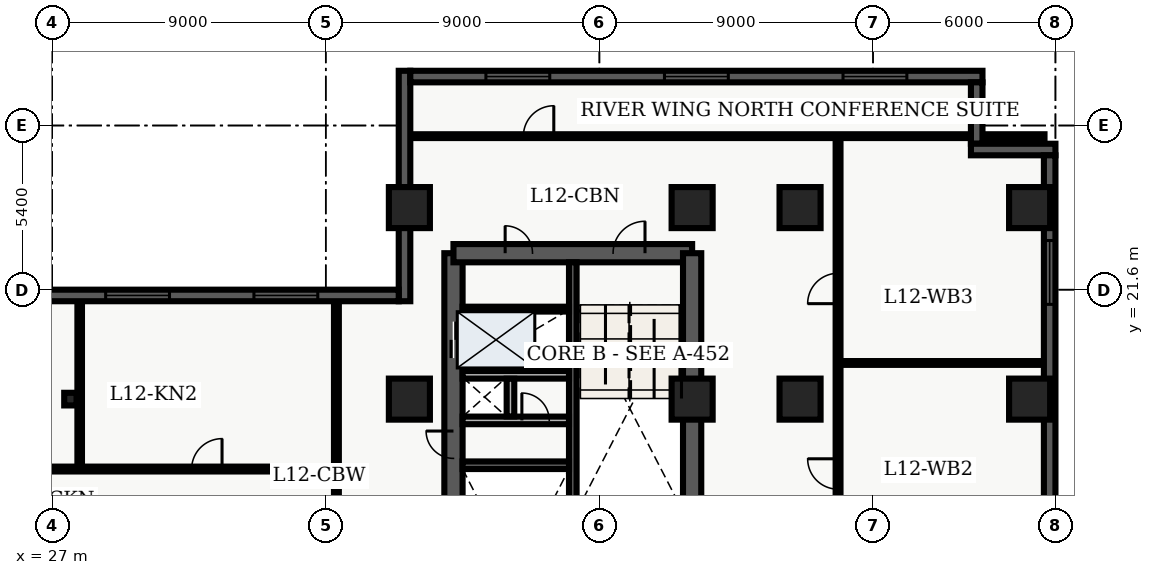
"""IFC4 building model, lengths in metres.
Left out: names, types, materials, properties, quantities, classifications, styles, units other than length and angle.
Written with IfcOpenShell. Run it as: python <this file> out.ifc"""

import sys

from ifc_helpers import new_model, entity, si_unit, converted_unit, direction, frame, origin_with_axes, origin_2d_with_axis, place, context, subcontext, project, spatial, polyline, rectangle, i_section, outline, extrude, element, fill, save


model = new_model("IFC4")
c1 = context("Model", 3, precision=1e-05, world=origin_with_axes(), true_north=direction((0.0, 1.0)))
c2 = subcontext(c1, "Body", "Model", "MODEL_VIEW")
j1 = project(units=[si_unit("LENGTHUNIT", "METRE"), converted_unit("PLANEANGLEUNIT", "DEGREE", entity("IfcPlaneAngleMeasure", 0.017), si_unit("PLANEANGLEUNIT", "RADIAN"), dimensions=[0, 0, 0, 0, 0, 0, 0])], contexts=[c1])
p1 = place(None, origin_with_axes())
s1 = spatial("IfcSite", under=j1, at=p1, CompositionType="ELEMENT")
p2 = place(p1, origin_with_axes())
s2 = spatial("IfcBuilding", under=s1, at=p2, CompositionType="ELEMENT")
p3 = place(p2, frame((0.0, 0.0, 52.2), z_axis=(0.0, 0.0, 1.0), x_axis=(1.0, 0.0, 0.0)))
s3 = spatial("IfcBuildingStorey", under=s2, at=p3, CompositionType="ELEMENT", Elevation=52.2)
p4 = place(p3, frame((40.2, 7.2, 0.0), z_axis=(0.0, 0.0, 1.0), x_axis=(0.0, 1.0, 0.0)))
e1 = element("IfcWall", 1, at=p4, inside=s3, PredefinedType="SHEAR", context=c2, shape_type="SweptSolid", body=[
    extrude(outline(polyline([(0.0, -0.3), (15.6, -0.3), (15.6, 0.3), (0.0, 0.3), (0.0, -0.3)])), origin_with_axes(), (0.0, 0.0, 1.0), 3.66),
])
p5 = place(p4, frame((12.75, 0.0, 0.0), z_axis=(0.0, 0.0, 1.0), x_axis=(1.0, 0.0, 0.0)))
e2 = element("IfcOpeningElement", 2, at=p5, cuts=e1, PredefinedType="OPENING", context=c2, shape_type="SweptSolid", body=[
    extrude(rectangle(XDim=1.2, YDim=0.62, at=origin_2d_with_axis()), origin_with_axes(), (0.0, 0.0, 1.0), 2.15),
])
p6 = place(p4, frame((9.3, 0.0, 0.0), z_axis=(0.0, 0.0, 1.0), x_axis=(1.0, 0.0, 0.0)))
e3 = element("IfcOpeningElement", 3, at=p6, cuts=e1, PredefinedType="OPENING", context=c2, shape_type="SweptSolid", body=[
    extrude(rectangle(XDim=0.9, YDim=0.62, at=origin_2d_with_axis()), origin_with_axes(), (0.0, 0.0, 1.0), 2.15),
])
p7 = place(p3, frame((40.2, 22.8, 0.0), z_axis=(0.0, 0.0, 1.0), x_axis=(1.0, 0.0, 0.0)))
e4 = element("IfcWall", 4, at=p7, inside=s3, PredefinedType="SHEAR", context=c2, shape_type="SweptSolid", body=[
    extrude(outline(polyline([(0.0, -0.3), (7.85, -0.3), (7.85, 0.3), (0.0, 0.3), (0.0, -0.3)])), origin_with_axes(), (0.0, 0.0, 1.0), 3.66),
])
p8 = place(p7, frame((5.775, 0.0, 0.0), z_axis=(0.0, 0.0, 1.0), x_axis=(1.0, 0.0, 0.0)))
e5 = element("IfcOpeningElement", 5, at=p8, cuts=e4, PredefinedType="OPENING", context=c2, shape_type="SweptSolid", body=[
    extrude(rectangle(XDim=1.05, YDim=0.62, at=origin_2d_with_axis()), origin_with_axes(), (0.0, 0.0, 1.0), 2.15),
])
p9 = place(p7, frame((2.15, 0.0, 0.0), z_axis=(0.0, 0.0, 1.0), x_axis=(1.0, 0.0, 0.0)))
e6 = element("IfcOpeningElement", 6, at=p9, cuts=e4, PredefinedType="OPENING", context=c2, shape_type="SweptSolid", body=[
    extrude(rectangle(XDim=0.9, YDim=0.62, at=origin_2d_with_axis()), origin_with_axes(), (0.0, 0.0, 1.0), 2.15),
])
p10 = place(p3, frame((48.05, 7.2, 0.0), z_axis=(0.0, 0.0, 1.0), x_axis=(0.0, 1.0, 0.0)))
e7 = element("IfcWall", 7, at=p10, inside=s3, PredefinedType="SHEAR", context=c2, shape_type="SweptSolid", body=[
    extrude(outline(polyline([(0.0, -0.3), (15.6, -0.3), (15.6, 0.3), (0.0, 0.3), (0.0, -0.3)])), origin_with_axes(), (0.0, 0.0, 1.0), 3.66),
])
p11 = place(p10, frame((1.425, 0.0, 0.0), z_axis=(0.0, 0.0, 1.0), x_axis=(1.0, 0.0, 0.0)))
e8 = element("IfcOpeningElement", 8, at=p11, cuts=e7, PredefinedType="OPENING", context=c2, shape_type="SweptSolid", body=[
    extrude(rectangle(XDim=1.05, YDim=0.62, at=origin_2d_with_axis()), origin_with_axes(), (0.0, 0.0, 1.0), 2.15),
])
p12 = place(p10, frame((3.475, 0.0, 0.0), z_axis=(0.0, 0.0, 1.0), x_axis=(1.0, 0.0, 0.0)))
e9 = element("IfcOpeningElement", 9, at=p12, cuts=e7, PredefinedType="OPENING", context=c2, shape_type="SweptSolid", body=[
    extrude(rectangle(XDim=1.05, YDim=0.62, at=origin_2d_with_axis()), origin_with_axes(), (0.0, 0.0, 1.0), 2.15),
])
p13 = place(p10, frame((5.625, 0.0, 0.0), z_axis=(0.0, 0.0, 1.0), x_axis=(1.0, 0.0, 0.0)))
e10 = element("IfcOpeningElement", 10, at=p13, cuts=e7, PredefinedType="OPENING", context=c2, shape_type="SweptSolid", body=[
    extrude(rectangle(XDim=0.95, YDim=0.62, at=origin_2d_with_axis()), origin_with_axes(), (0.0, 0.0, 1.0), 2.15),
])
p14 = place(p3, frame((44.125, 7.5, 0.0), z_axis=(0.0, 0.0, 1.0), x_axis=(0.0, 1.0, 0.0)))
e11 = element("IfcWall", 11, at=p14, inside=s3, PredefinedType="SHEAR", context=c2, shape_type="SweptSolid", body=[
    extrude(outline(polyline([(0.0, -0.125), (15.0, -0.125), (15.0, 0.125), (0.0, 0.125), (0.0, -0.125)])), origin_with_axes(), (0.0, 0.0, 1.0), 3.66),
])
p15 = place(p3, frame((40.5, 15.825, 0.0), z_axis=(0.0, 0.0, 1.0), x_axis=(1.0, 0.0, 0.0)))
e12 = element("IfcWall", 12, at=p15, inside=s3, PredefinedType="SHEAR", context=c2, shape_type="SweptSolid", body=[
    extrude(outline(polyline([(0.0, -0.125), (3.5, -0.125), (3.5, 0.125), (0.0, 0.125), (0.0, -0.125)])), origin_with_axes(), (0.0, 0.0, 1.0), 3.66),
])
p16 = place(p3, frame((40.5, 17.3, 0.0), z_axis=(0.0, 0.0, 1.0), x_axis=(1.0, 0.0, 0.0)))
e13 = element("IfcWall", 13, at=p16, inside=s3, PredefinedType="SOLIDWALL", context=c2, shape_type="SweptSolid", body=[
    extrude(outline(polyline([(0.0, -0.125), (3.5, -0.125), (3.5, 0.125), (0.0, 0.125), (0.0, -0.125)])), origin_with_axes(), (0.0, 0.0, 1.0), 2.7),
])
p17 = place(p16, frame((2.4, 0.0, 0.0), z_axis=(0.0, 0.0, 1.0), x_axis=(1.0, 0.0, 0.0)))
e14 = element("IfcOpeningElement", 14, at=p17, cuts=e13, PredefinedType="OPENING", context=c2, shape_type="SweptSolid", body=[
    extrude(rectangle(XDim=0.9, YDim=0.27, at=origin_2d_with_axis()), origin_with_axes(), (0.0, 0.0, 1.0), 2.15),
])
p18 = place(p3, frame((40.5, 18.8, 0.0), z_axis=(0.0, 0.0, 1.0), x_axis=(1.0, 0.0, 0.0)))
e15 = element("IfcWall", 15, at=p18, inside=s3, PredefinedType="SOLIDWALL", context=c2, shape_type="SweptSolid", body=[
    extrude(outline(polyline([(0.0, -0.125), (3.5, -0.125), (3.5, 0.125), (0.0, 0.125), (0.0, -0.125)])), origin_with_axes(), (0.0, 0.0, 1.0), 2.7),
])
p19 = place(p3, frame((42.075, 17.43, 0.0), z_axis=(0.0, 0.0, 1.0), x_axis=(0.0, 1.0, 0.0)))
e16 = element("IfcWall", 16, at=p19, inside=s3, PredefinedType="SOLIDWALL", context=c2, shape_type="SweptSolid", body=[
    extrude(outline(polyline([(0.0, -0.125), (1.24, -0.125), (1.24, 0.125), (0.0, 0.125), (0.0, -0.125)])), origin_with_axes(), (0.0, 0.0, 1.0), 2.7),
])
p20 = place(p3, frame((27.6, 18.0, 0.0), z_axis=(0.0, 0.0, 1.0), x_axis=(1.0, 0.0, 0.0)))
e17 = element("IfcColumn", 17, at=p20, inside=s3, PredefinedType="COLUMN", context=c2, shape_type="SweptSolid", body=[
    extrude(i_section(OverallWidth=0.406, OverallDepth=0.416, WebThickness=0.03, FlangeThickness=0.048, FilletRadius=0.022, at=origin_2d_with_axis()), origin_with_axes(), (0.0, 0.0, 1.0), 3.9),
])
for number, where, z_axis, x_axis in (
    (18, (38.75, 18.0, 0.0), (0.0, 0.0, 1.0), (1.0, 0.0, 0.0)),
    (19, (38.75, 24.3, 0.0), (0.0, 0.0, 1.0), (1.0, 0.0, 0.0)),
    (20, (48.05, 18.0, 0.0), (0.0, 0.0, 1.0), (1.0, 0.0, 0.0)),
    (21, (48.05, 24.3, 0.0), (0.0, 0.0, 1.0), (1.0, 0.0, 0.0)),
    (22, (51.6, 18.0, 0.0), (0.0, 0.0, 1.0), (1.0, 0.0, 0.0)),
    (23, (51.6, 24.3, 0.0), (0.0, 0.0, 1.0), (1.0, 0.0, 0.0)),
    (24, (59.15, 18.0, 0.0), (0.0, 0.0, 1.0), (1.0, 0.0, 0.0)),
    (25, (59.15, 24.3, 0.0), (0.0, 0.0, 1.0), (1.0, 0.0, 0.0)),
):
    element("IfcColumn", number, at=place(p3, frame(where, z_axis=z_axis, x_axis=x_axis)), inside=s3, PredefinedType="COLUMN", context=c2, shape_type="SweptSolid", body=[
        extrude(rectangle(XDim=1.35, YDim=1.35, at=origin_2d_with_axis()), origin_with_axes(), (0.0, 0.0, 1.0), 3.9),
    ])
p21 = place(p3, frame((40.5, 20.96, 0.0), z_axis=(0.0, 0.0, 1.0), x_axis=(1.0, 0.0, 0.0)))
e26 = element("IfcWall", 26, at=p21, inside=s3, PredefinedType="PARTITIONING", context=c2, shape_type="SweptSolid", body=[
    extrude(outline(polyline([(0.0, -0.08), (3.5, -0.08), (3.5, 0.08), (0.0, 0.08), (0.0, -0.08)])), origin_with_axes(), (0.0, 0.0, 1.0), 2.7),
])
p22 = place(p3, frame((21.15, 15.7, 0.0), z_axis=(0.0, 0.0, 1.0), x_axis=(1.0, 0.0, 0.0)))
e27 = element("IfcWall", 27, at=p22, inside=s3, PredefinedType="PARTITIONING", context=c2, shape_type="SweptSolid", body=[
    extrude(outline(polyline([(0.0, -0.08), (15.2, -0.08), (15.2, 0.08), (0.0, 0.08), (0.0, -0.08)])), origin_with_axes(), (0.0, 0.0, 1.0), 2.7),
])
p23 = place(p22, frame((3.468, 0.0, 0.0), z_axis=(0.0, 0.0, 1.0), x_axis=(1.0, 0.0, 0.0)))
e28 = element("IfcOpeningElement", 28, at=p23, cuts=e27, PredefinedType="OPENING", context=c2, shape_type="SweptSolid", body=[
    extrude(rectangle(XDim=1.0, YDim=0.18, at=origin_2d_with_axis()), origin_with_axes(), (0.0, 0.0, 1.0), 2.15),
])
p24 = place(p22, frame((10.938, 0.0, 0.0), z_axis=(0.0, 0.0, 1.0), x_axis=(1.0, 0.0, 0.0)))
e29 = element("IfcOpeningElement", 29, at=p24, cuts=e27, PredefinedType="OPENING", context=c2, shape_type="SweptSolid", body=[
    extrude(rectangle(XDim=1.0, YDim=0.18, at=origin_2d_with_axis()), origin_with_axes(), (0.0, 0.0, 1.0), 2.15),
])
p25 = place(p3, frame((36.35, 4.35, 0.0), z_axis=(0.0, 0.0, 1.0), x_axis=(0.0, 1.0, 0.0)))
e30 = element("IfcWall", 30, at=p25, inside=s3, PredefinedType="PARTITIONING", context=c2, shape_type="SweptSolid", body=[
    extrude(outline(polyline([(0.0, -0.08), (16.95, -0.08), (16.95, 0.08), (0.0, 0.08), (0.0, -0.08)])), origin_with_axes(), (0.0, 0.0, 1.0), 2.7),
])
p26 = place(p3, frame((27.906, 15.82, 0.0), z_axis=(0.0, 0.0, 1.0), x_axis=(0.0, 1.0, 0.0)))
e31 = element("IfcWall", 31, at=p26, inside=s3, PredefinedType="PARTITIONING", context=c2, shape_type="SweptSolid", body=[
    extrude(outline(polyline([(0.0, -0.075), (5.405, -0.075), (5.405, 0.075), (0.0, 0.075), (0.0, -0.075)])), origin_with_axes(), (0.0, 0.0, 1.0), 2.7),
])
p27 = place(p3, frame((52.85, 7.85, 0.0), z_axis=(0.0, 0.0, 1.0), x_axis=(0.0, 1.0, 0.0)))
e32 = element("IfcWall", 32, at=p27, inside=s3, PredefinedType="PARTITIONING", context=c2, shape_type="SweptSolid", body=[
    extrude(outline(polyline([(0.0, -0.08), (18.8, -0.08), (18.8, 0.08), (0.0, 0.08), (0.0, -0.08)])), origin_with_axes(), (0.0, 0.0, 1.0), 2.7),
])
p28 = place(p27, frame((4.484, 0.0, 0.0), z_axis=(0.0, 0.0, 1.0), x_axis=(1.0, 0.0, 0.0)))
e33 = element("IfcOpeningElement", 33, at=p28, cuts=e32, PredefinedType="OPENING", context=c2, shape_type="SweptSolid", body=[
    extrude(rectangle(XDim=1.0, YDim=0.18, at=origin_2d_with_axis()), origin_with_axes(), (0.0, 0.0, 1.0), 2.15),
])
p29 = place(p27, frame((7.687, 0.0, 0.0), z_axis=(0.0, 0.0, 1.0), x_axis=(1.0, 0.0, 0.0)))
e34 = element("IfcOpeningElement", 34, at=p29, cuts=e32, PredefinedType="OPENING", context=c2, shape_type="SweptSolid", body=[
    extrude(rectangle(XDim=1.0, YDim=0.18, at=origin_2d_with_axis()), origin_with_axes(), (0.0, 0.0, 1.0), 2.15),
])
p30 = place(p27, frame((13.79, 0.0, 0.0), z_axis=(0.0, 0.0, 1.0), x_axis=(1.0, 0.0, 0.0)))
e35 = element("IfcOpeningElement", 35, at=p30, cuts=e32, PredefinedType="OPENING", context=c2, shape_type="SweptSolid", body=[
    extrude(rectangle(XDim=1.0, YDim=0.18, at=origin_2d_with_axis()), origin_with_axes(), (0.0, 0.0, 1.0), 2.15),
])
p31 = place(p3, frame((38.76, 26.65, 0.0), z_axis=(0.0, 0.0, 1.0), x_axis=(1.0, 0.0, 0.0)))
e36 = element("IfcWall", 36, at=p31, inside=s3, PredefinedType="PARTITIONING", context=c2, shape_type="SweptSolid", body=[
    extrude(outline(polyline([(0.0, -0.062), (20.88, -0.062), (20.88, 0.062), (0.0, 0.062), (0.0, -0.062)])), origin_with_axes(), (0.0, 0.0, 1.0), 2.7),
])
p32 = place(p31, frame((4.24, 0.0, 0.0), z_axis=(0.0, 0.0, 1.0), x_axis=(1.0, 0.0, 0.0)))
e37 = element("IfcOpeningElement", 37, at=p32, cuts=e36, PredefinedType="OPENING", context=c2, shape_type="SweptSolid", body=[
    extrude(rectangle(XDim=1.0, YDim=0.145, at=origin_2d_with_axis()), origin_with_axes(), (0.0, 0.0, 1.0), 2.15),
])
p33 = place(p3, frame((52.97, 19.189, 0.0), z_axis=(0.0, 0.0, 1.0), x_axis=(1.0, 0.0, 0.0)))
e38 = element("IfcWall", 38, at=p33, inside=s3, PredefinedType="PARTITIONING", context=c2, shape_type="SweptSolid", body=[
    extrude(outline(polyline([(0.0, -0.062), (6.655, -0.062), (6.655, 0.062), (0.0, 0.062), (0.0, -0.062)])), origin_with_axes(), (0.0, 0.0, 1.0), 2.7),
])
p34 = place(p3, frame((38.59, 21.22, 0.0), z_axis=(0.0, 0.0, 1.0), x_axis=(0.0, 1.0, 0.0)))
e39 = element("IfcWall", 39, at=p34, inside=s3, PredefinedType="SOLIDWALL", context=c2, shape_type="SweptSolid", body=[
    extrude(outline(polyline([(0.0, -0.19), (7.58, -0.19), (7.58, 0.19), (0.0, 0.19), (0.0, -0.19)])), origin_with_axes(), (0.0, 0.0, 1.0), 3.66),
])
p35 = place(p3, frame((38.78, 28.61, 0.0), z_axis=(0.0, 0.0, 1.0), x_axis=(1.0, 0.0, 0.0)))
e40 = element("IfcWall", 40, at=p35, inside=s3, PredefinedType="SOLIDWALL", context=c2, shape_type="SweptSolid", body=[
    extrude(outline(polyline([(0.0, -0.19), (18.82, -0.19), (18.82, 0.19), (0.0, 0.19), (0.0, -0.19)])), origin_with_axes(), (0.0, 0.0, 1.0), 3.66),
])
p36 = place(p35, frame((3.537, 0.0, 0.45), z_axis=(0.0, 0.0, 1.0), x_axis=(1.0, 0.0, 0.0)))
e41 = element("IfcOpeningElement", 41, at=p36, cuts=e40, PredefinedType="OPENING", context=c2, shape_type="SweptSolid", body=[
    extrude(rectangle(XDim=2.1, YDim=0.4, at=origin_2d_with_axis()), origin_with_axes(), (0.0, 0.0, 1.0), 2.2),
])
p37 = place(p35, frame((9.41, 0.0, 0.45), z_axis=(0.0, 0.0, 1.0), x_axis=(1.0, 0.0, 0.0)))
e42 = element("IfcOpeningElement", 42, at=p37, cuts=e40, PredefinedType="OPENING", context=c2, shape_type="SweptSolid", body=[
    extrude(rectangle(XDim=2.1, YDim=0.4, at=origin_2d_with_axis()), origin_with_axes(), (0.0, 0.0, 1.0), 2.2),
])
p38 = place(p35, frame((15.283, 0.0, 0.45), z_axis=(0.0, 0.0, 1.0), x_axis=(1.0, 0.0, 0.0)))
e43 = element("IfcOpeningElement", 43, at=p38, cuts=e40, PredefinedType="OPENING", context=c2, shape_type="SweptSolid", body=[
    extrude(rectangle(XDim=2.1, YDim=0.4, at=origin_2d_with_axis()), origin_with_axes(), (0.0, 0.0, 1.0), 2.2),
])
p39 = place(p3, frame((57.41, 28.42, 0.0), z_axis=(0.0, 0.0, 1.0), x_axis=(0.0, -1.0, 0.0)))
e44 = element("IfcWall", 44, at=p39, inside=s3, PredefinedType="SOLIDWALL", context=c2, shape_type="SweptSolid", body=[
    extrude(outline(polyline([(0.0, -0.19), (2.02, -0.19), (2.02, 0.19), (0.0, 0.19), (0.0, -0.19)])), origin_with_axes(), (0.0, 0.0, 1.0), 3.66),
])
p40 = place(p3, frame((57.22, 26.21, 0.0), z_axis=(0.0, 0.0, 1.0), x_axis=(1.0, 0.0, 0.0)))
e45 = element("IfcWall", 45, at=p40, inside=s3, PredefinedType="SOLIDWALL", context=c2, shape_type="SweptSolid", body=[
    extrude(outline(polyline([(0.0, -0.19), (2.78, -0.19), (2.78, 0.19), (0.0, 0.19), (0.0, -0.19)])), origin_with_axes(), (0.0, 0.0, 1.0), 3.66),
])
p41 = place(p3, frame((59.81, 26.02, 0.0), z_axis=(0.0, 0.0, 1.0), x_axis=(0.0, -1.0, 0.0)))
e46 = element("IfcWall", 46, at=p41, inside=s3, PredefinedType="SOLIDWALL", context=c2, shape_type="SweptSolid", body=[
    extrude(outline(polyline([(0.0, -0.19), (23.62, -0.19), (23.62, 0.19), (0.0, 0.19), (0.0, -0.19)])), origin_with_axes(), (0.0, 0.0, 1.0), 3.66),
])
p42 = place(p41, frame((3.853, 0.0, 0.45), z_axis=(0.0, 0.0, 1.0), x_axis=(1.0, 0.0, 0.0)))
e47 = element("IfcOpeningElement", 47, at=p42, cuts=e46, PredefinedType="OPENING", context=c2, shape_type="SweptSolid", body=[
    extrude(rectangle(XDim=2.1, YDim=0.4, at=origin_2d_with_axis()), origin_with_axes(), (0.0, 0.0, 1.0), 2.2),
])
p43 = place(p41, frame((20.218, 0.0, 0.45), z_axis=(0.0, 0.0, 1.0), x_axis=(1.0, 0.0, 0.0)))
e48 = element("IfcOpeningElement", 48, at=p43, cuts=e46, PredefinedType="OPENING", context=c2, shape_type="SweptSolid", body=[
    extrude(rectangle(XDim=2.1, YDim=0.4, at=origin_2d_with_axis()), origin_with_axes(), (0.0, 0.0, 1.0), 2.2),
])
p44 = place(p3, frame((21.22, 21.41, 0.0), z_axis=(0.0, 0.0, 1.0), x_axis=(1.0, 0.0, 0.0)))
e49 = element("IfcWall", 49, at=p44, inside=s3, PredefinedType="SOLIDWALL", context=c2, shape_type="SweptSolid", body=[
    extrude(outline(polyline([(0.0, -0.19), (17.18, -0.19), (17.18, 0.19), (0.0, 0.19), (0.0, -0.19)])), origin_with_axes(), (0.0, 0.0, 1.0), 3.66),
])
p45 = place(p44, frame((3.263, 0.0, 0.45), z_axis=(0.0, 0.0, 1.0), x_axis=(1.0, 0.0, 0.0)))
e50 = element("IfcOpeningElement", 50, at=p45, cuts=e49, PredefinedType="OPENING", context=c2, shape_type="SweptSolid", body=[
    extrude(rectangle(XDim=2.1, YDim=0.4, at=origin_2d_with_axis()), origin_with_axes(), (0.0, 0.0, 1.0), 2.2),
])
p46 = place(p44, frame((8.59, 0.0, 0.45), z_axis=(0.0, 0.0, 1.0), x_axis=(1.0, 0.0, 0.0)))
e51 = element("IfcOpeningElement", 51, at=p46, cuts=e49, PredefinedType="OPENING", context=c2, shape_type="SweptSolid", body=[
    extrude(rectangle(XDim=2.1, YDim=0.4, at=origin_2d_with_axis()), origin_with_axes(), (0.0, 0.0, 1.0), 2.2),
])
p47 = place(p44, frame((13.467, 0.0, 0.45), z_axis=(0.0, 0.0, 1.0), x_axis=(1.0, 0.0, 0.0)))
e52 = element("IfcOpeningElement", 52, at=p47, cuts=e49, PredefinedType="OPENING", context=c2, shape_type="SweptSolid", body=[
    extrude(rectangle(XDim=2.1, YDim=0.4, at=origin_2d_with_axis()), origin_with_axes(), (0.0, 0.0, 1.0), 2.2),
])
p48 = place(p4, frame((12.75, 0.0, 0.0), z_axis=(0.0, 0.0, 1.0), x_axis=(1.0, 0.0, 0.0)))
e53 = element("IfcDoor", 53, at=p48, inside=s3, OperationType="DOUBLE_DOOR_SLIDING", PredefinedType="DOOR", context=c2, shape_type="SweptSolid", body=[
    extrude(rectangle(XDim=1.2, YDim=0.09, at=origin_2d_with_axis()), origin_with_axes(), (0.0, 0.0, 1.0), 2.15),
])
fill(e2, e53)
p49 = place(p4, frame((9.3, 0.0, 0.0), z_axis=(0.0, 0.0, 1.0), x_axis=(1.0, 0.0, 0.0)))
e54 = element("IfcDoor", 54, at=p49, inside=s3, OperationType="SINGLE_SWING_RIGHT", PredefinedType="DOOR", context=c2, shape_type="SweptSolid", body=[
    extrude(rectangle(XDim=0.9, YDim=0.09, at=origin_2d_with_axis()), origin_with_axes(), (0.0, 0.0, 1.0), 2.15),
])
fill(e3, e54)
p50 = place(p16, frame((2.4, 0.0, 0.0), z_axis=(0.0, 0.0, 1.0), x_axis=(1.0, 0.0, 0.0)))
e55 = element("IfcDoor", 55, at=p50, inside=s3, OperationType="SINGLE_SWING_LEFT", PredefinedType="DOOR", context=c2, shape_type="SweptSolid", body=[
    extrude(rectangle(XDim=0.9, YDim=0.09, at=origin_2d_with_axis()), origin_with_axes(), (0.0, 0.0, 1.0), 2.15),
])
fill(e14, e55)
p51 = place(p7, frame((5.775, 0.0, 0.0), z_axis=(0.0, 0.0, 1.0), x_axis=(1.0, 0.0, 0.0)))
e56 = element("IfcDoor", 56, at=p51, inside=s3, OperationType="SINGLE_SWING_RIGHT", PredefinedType="DOOR", context=c2, shape_type="SweptSolid", body=[
    extrude(rectangle(XDim=1.05, YDim=0.09, at=origin_2d_with_axis()), origin_with_axes(), (0.0, 0.0, 1.0), 2.15),
])
fill(e5, e56)
p52 = place(p7, frame((2.15, 0.0, 0.0), z_axis=(0.0, 0.0, 1.0), x_axis=(1.0, 0.0, 0.0)))
e57 = element("IfcDoor", 57, at=p52, inside=s3, OperationType="SINGLE_SWING_LEFT", PredefinedType="DOOR", context=c2, shape_type="SweptSolid", body=[
    extrude(rectangle(XDim=0.9, YDim=0.09, at=origin_2d_with_axis()), origin_with_axes(), (0.0, 0.0, 1.0), 2.15),
])
fill(e6, e57)
p53 = place(p22, frame((10.938, 0.0, 0.0), z_axis=(0.0, 0.0, 1.0), x_axis=(1.0, 0.0, 0.0)))
e58 = element("IfcDoor", 58, at=p53, inside=s3, OperationType="SINGLE_SWING_RIGHT", PredefinedType="DOOR", context=c2, shape_type="SweptSolid", body=[
    extrude(rectangle(XDim=1.0, YDim=0.09, at=origin_2d_with_axis()), origin_with_axes(), (0.0, 0.0, 1.0), 2.15),
])
fill(e29, e58)
p54 = place(p31, frame((4.24, 0.0, 0.0), z_axis=(0.0, 0.0, 1.0), x_axis=(1.0, 0.0, 0.0)))
e59 = element("IfcDoor", 59, at=p54, inside=s3, OperationType="SINGLE_SWING_RIGHT", PredefinedType="DOOR", context=c2, shape_type="SweptSolid", body=[
    extrude(rectangle(XDim=1.0, YDim=0.075, at=origin_2d_with_axis()), origin_with_axes(), (0.0, 0.0, 1.0), 2.15),
])
fill(e37, e59)
p55 = place(p27, frame((7.687, 0.0, 0.0), z_axis=(0.0, 0.0, 1.0), x_axis=(1.0, 0.0, 0.0)))
e60 = element("IfcDoor", 60, at=p55, inside=s3, OperationType="SINGLE_SWING_RIGHT", PredefinedType="DOOR", context=c2, shape_type="SweptSolid", body=[
    extrude(rectangle(XDim=1.0, YDim=0.09, at=origin_2d_with_axis()), origin_with_axes(), (0.0, 0.0, 1.0), 2.15),
])
fill(e34, e60)
p56 = place(p27, frame((13.79, 0.0, 0.0), z_axis=(0.0, 0.0, 1.0), x_axis=(1.0, 0.0, 0.0)))
e61 = element("IfcDoor", 61, at=p56, inside=s3, OperationType="SINGLE_SWING_LEFT", PredefinedType="DOOR", context=c2, shape_type="SweptSolid", body=[
    extrude(rectangle(XDim=1.0, YDim=0.09, at=origin_2d_with_axis()), origin_with_axes(), (0.0, 0.0, 1.0), 2.15),
])
fill(e35, e61)
p57 = place(p35, frame((3.537, 0.0, 0.45), z_axis=(0.0, 0.0, 1.0), x_axis=(1.0, 0.0, 0.0)))
e62 = element("IfcWindow", 62, at=p57, inside=s3, PredefinedType="WINDOW", context=c2, shape_type="SweptSolid", body=[
    extrude(rectangle(XDim=2.1, YDim=0.09, at=origin_2d_with_axis()), origin_with_axes(), (0.0, 0.0, 1.0), 2.2),
])
fill(e41, e62)
p58 = place(p35, frame((9.41, 0.0, 0.45), z_axis=(0.0, 0.0, 1.0), x_axis=(1.0, 0.0, 0.0)))
e63 = element("IfcWindow", 63, at=p58, inside=s3, PredefinedType="WINDOW", context=c2, shape_type="SweptSolid", body=[
    extrude(rectangle(XDim=2.1, YDim=0.09, at=origin_2d_with_axis()), origin_with_axes(), (0.0, 0.0, 1.0), 2.2),
])
fill(e42, e63)
p59 = place(p35, frame((15.283, 0.0, 0.45), z_axis=(0.0, 0.0, 1.0), x_axis=(1.0, 0.0, 0.0)))
e64 = element("IfcWindow", 64, at=p59, inside=s3, PredefinedType="WINDOW", context=c2, shape_type="SweptSolid", body=[
    extrude(rectangle(XDim=2.1, YDim=0.09, at=origin_2d_with_axis()), origin_with_axes(), (0.0, 0.0, 1.0), 2.2),
])
fill(e43, e64)
p60 = place(p41, frame((3.853, 0.0, 0.45), z_axis=(0.0, 0.0, 1.0), x_axis=(1.0, 0.0, 0.0)))
e65 = element("IfcWindow", 65, at=p60, inside=s3, PredefinedType="WINDOW", context=c2, shape_type="SweptSolid", body=[
    extrude(rectangle(XDim=2.1, YDim=0.09, at=origin_2d_with_axis()), origin_with_axes(), (0.0, 0.0, 1.0), 2.2),
])
fill(e47, e65)
p61 = place(p44, frame((8.59, 0.0, 0.45), z_axis=(0.0, 0.0, 1.0), x_axis=(1.0, 0.0, 0.0)))
e66 = element("IfcWindow", 66, at=p61, inside=s3, PredefinedType="WINDOW", context=c2, shape_type="SweptSolid", body=[
    extrude(rectangle(XDim=2.1, YDim=0.09, at=origin_2d_with_axis()), origin_with_axes(), (0.0, 0.0, 1.0), 2.2),
])
fill(e51, e66)
p62 = place(p44, frame((13.467, 0.0, 0.45), z_axis=(0.0, 0.0, 1.0), x_axis=(1.0, 0.0, 0.0)))
e67 = element("IfcWindow", 67, at=p62, inside=s3, PredefinedType="WINDOW", context=c2, shape_type="SweptSolid", body=[
    extrude(rectangle(XDim=2.1, YDim=0.09, at=origin_2d_with_axis()), origin_with_axes(), (0.0, 0.0, 1.0), 2.2),
])
fill(e52, e67)
save(model, sys.argv[1])
